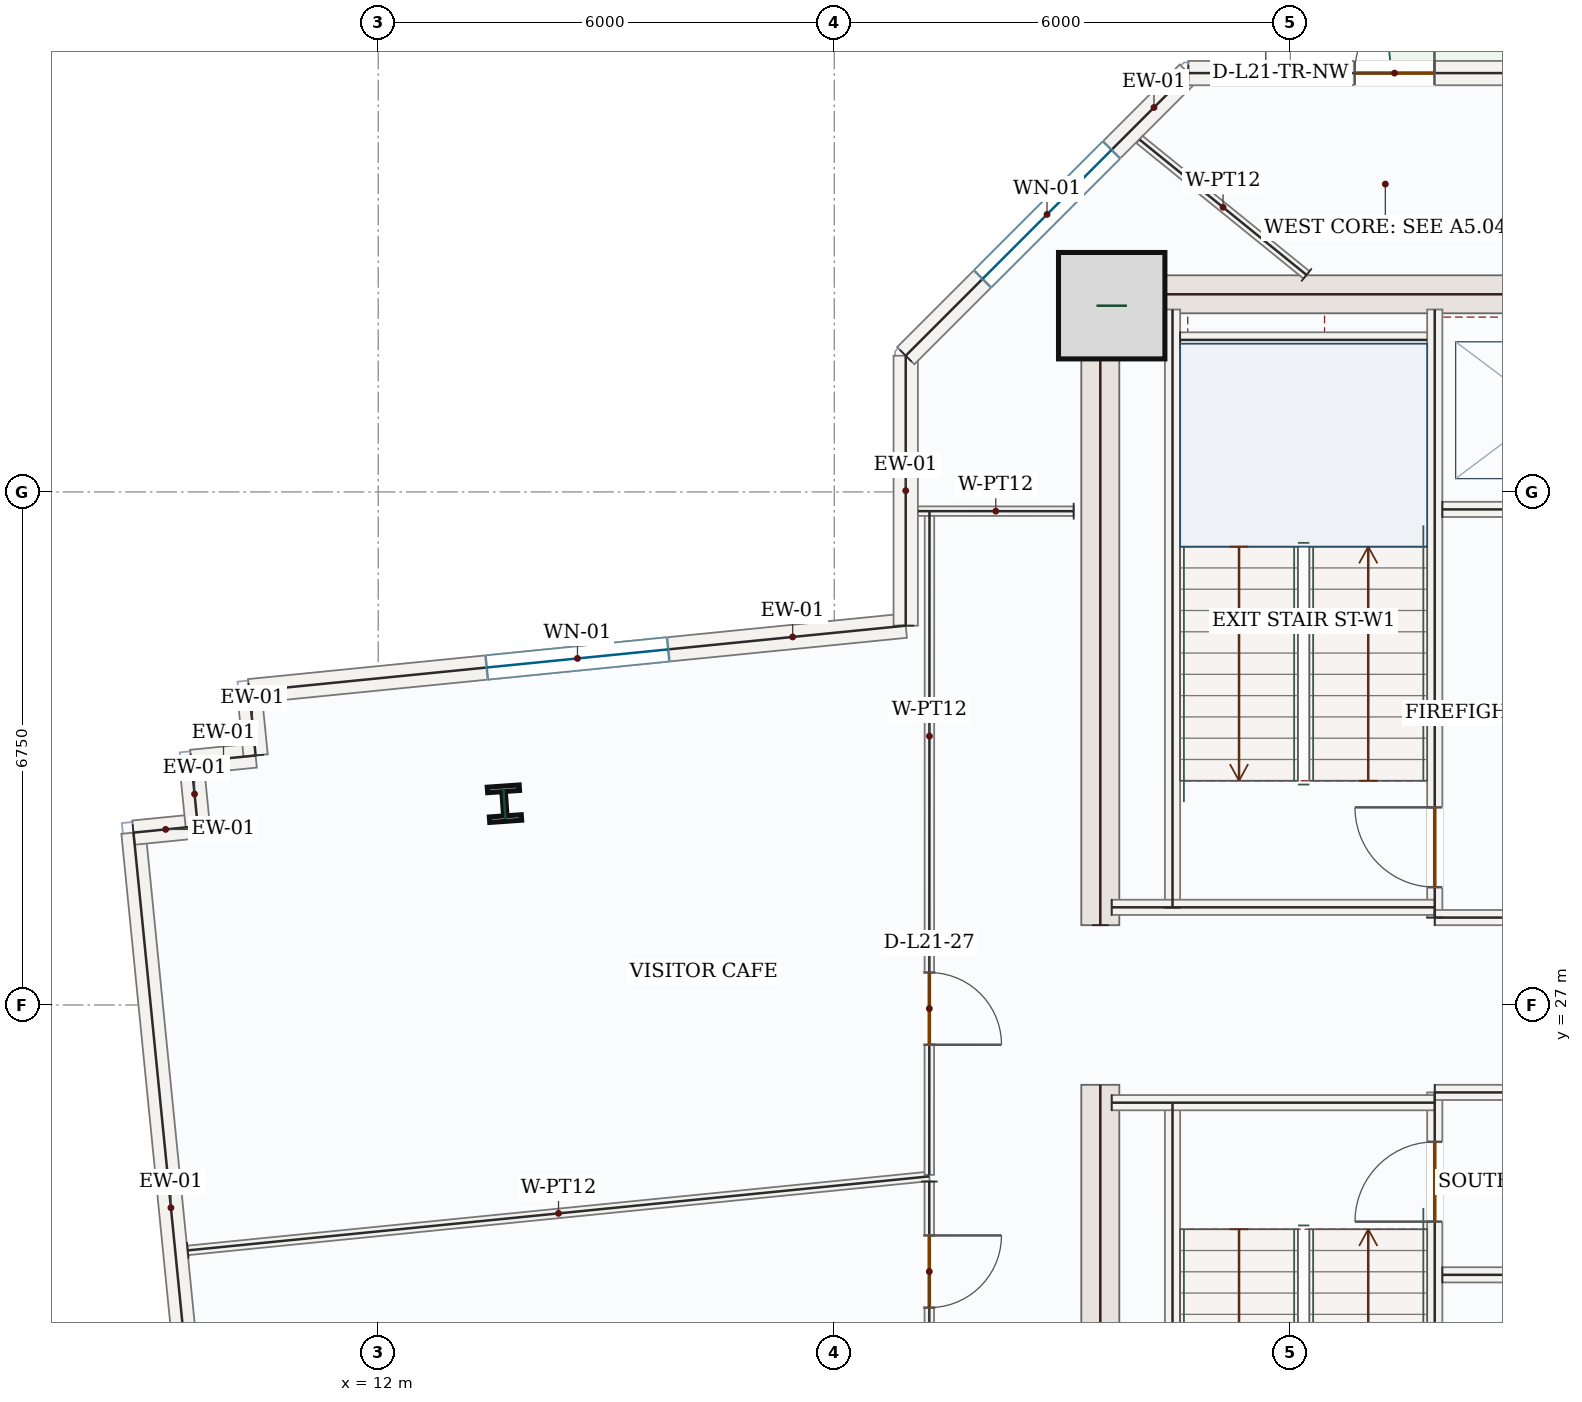
"""IFC4 building model, lengths in metres.
Left out: names, types, materials, properties, quantities, classifications, styles, units other than length and angle.
Written with IfcOpenShell. Run it as: python <this file> out.ifc"""

import sys

from ifc_helpers import new_model, si_unit, direction, frame, frame_2d, origin, origin_2d, place, context, subcontext, project, spatial, rectangle, i_section, extrude, source, transform, mapped, element, fill, save


model = new_model("IFC4")
c1 = context("Model", 3, precision=1e-05, world=origin(), true_north=direction((0.0, 1.0)))
c2 = subcontext(c1, "Body", "Model", "MODEL_VIEW")
j1 = project(units=[si_unit("LENGTHUNIT", "METRE"), si_unit("PLANEANGLEUNIT", "RADIAN")], contexts=[c1])
p1 = place(None, origin())
s1 = spatial("IfcSite", under=j1, at=p1, CompositionType="ELEMENT")
p2 = place(p1, origin())
s2 = spatial("IfcBuilding", under=s1, at=p2, CompositionType="ELEMENT")
p3 = place(p2, frame((0.0, 0.0, 96.3)))
s3 = spatial("IfcBuildingStorey", under=s2, at=p3, CompositionType="ELEMENT", Elevation=96.3)
m1 = source(origin(), c2, "Body", "SweptSolid", [
    extrude(rectangle(XDim=8.55, YDim=0.5, at=frame_2d((4.275, 0.0))), origin(), (0.0, 0.0, 1.0), 3.95),
])
for number, where, z_axis, x_axis in (
    (1, (21.5, 17.4, 0.0), (0.0, 0.0, 1.0), (0.0, 1.0, 0.0)),
    (2, (21.5, 28.05, 0.0), (0.0, 0.0, 1.0), (0.0, 1.0, 0.0)),
):
    element("IfcWall", number, at=place(p3, frame(where, z_axis=z_axis, x_axis=x_axis)), inside=s3, PredefinedType="SHEAR", context=c2, shape_type="MappedRepresentation", body=[
        mapped(m1, transform((0.0, 0.0, 0.0), x_axis=(1.0, 0.0, 0.0), y_axis=(0.0, 1.0, 0.0), z_axis=(0.0, 0.0, 1.0), scale=1.0)),
    ])
m2 = source(origin(), c2, "Body", "SweptSolid", [
    extrude(rectangle(XDim=7.0, YDim=0.5, at=frame_2d((3.5, 0.0))), origin(), (0.0, 0.0, 1.0), 3.95),
])
p4 = place(p3, frame((21.75, 36.35, 0.0), z_axis=(0.0, 0.0, 1.0), x_axis=(1.0, 0.0, 0.0)))
e3 = element("IfcWall", 3, at=p4, inside=s3, PredefinedType="SHEAR", context=c2, shape_type="MappedRepresentation", body=[
    mapped(m2, transform((0.0, 0.0, 0.0), x_axis=(1.0, 0.0, 0.0), y_axis=(0.0, 1.0, 0.0), z_axis=(0.0, 0.0, 1.0), scale=1.0)),
])
m3 = source(origin(), c2, "Body", "SweptSolid", [
    extrude(rectangle(XDim=1.4, YDim=1.4, at=origin_2d()), origin(), (0.0, 0.0, 1.0), 4.2),
])
p5 = place(p3, frame((21.65, 36.2, 0.0), z_axis=(0.0, 0.0, 1.0), x_axis=(1.0, 0.0, 0.0)))
e4 = element("IfcColumn", 4, at=p5, inside=s3, PredefinedType="COLUMN", context=c2, shape_type="MappedRepresentation", body=[
    mapped(m3, transform((0.0, 0.0, 0.0), x_axis=(1.0, 0.0, 0.0), y_axis=(0.0, 1.0, 0.0), z_axis=(0.0, 0.0, 1.0), scale=1.0)),
])
m4 = source(origin(), c2, "Body", "SweptSolid", [
    extrude(i_section(OverallWidth=0.421, OverallDepth=0.465, WebThickness=0.045, FlangeThickness=0.073, FilletRadius=0.018, at=origin_2d()), origin(), (0.0, 0.0, 1.0), 4.2),
])
p6 = place(p3, frame((13.661, 29.648, 0.0), z_axis=(0.0, 0.0, 1.0), x_axis=(0.99756405026, 0.069756473744, 0.0)))
e5 = element("IfcColumn", 5, at=p6, inside=s3, PredefinedType="COLUMN", context=c2, shape_type="MappedRepresentation", body=[
    mapped(m4, transform((0.0, 0.0, 0.0), x_axis=(1.0, 0.0, 0.0), y_axis=(0.0, 1.0, 0.0), z_axis=(0.0, 0.0, 1.0), scale=1.0)),
])
m5 = source(origin(), c2, "Body", "SweptSolid", [
    extrude(rectangle(XDim=9.92, YDim=0.32, at=frame_2d((4.96, 0.0))), origin(), (0.0, 0.0, 1.0), 3.95),
])
p7 = place(p3, frame((9.765, 19.397, 0.0), z_axis=(0.0, 0.0, 1.0), x_axis=(-0.099303907908, 0.995057151059, 0.0)))
e6 = element("IfcWall", 6, at=p7, inside=s3, PredefinedType="SOLIDWALL", context=c2, shape_type="MappedRepresentation", body=[
    mapped(m5, transform((0.0, 0.0, 0.0), x_axis=(1.0, 0.0, 0.0), y_axis=(0.0, 1.0, 0.0), z_axis=(0.0, 0.0, 1.0), scale=1.0)),
])
m6 = source(origin(), c2, "Body", "SweptSolid", [
    extrude(rectangle(XDim=0.85, YDim=0.32, at=frame_2d((0.425, 0.0))), origin(), (0.0, 0.0, 1.0), 3.95),
])
for number, where, z_axis, x_axis in (
    (7, (8.78, 29.268, 0.0), (0.0, 0.0, 1.0), (0.995, 0.099, 0.0)),
    (8, (9.626, 29.352, 0.0), (0.0, 0.0, 1.0), (-0.099, 0.995, 0.0)),
    (9, (9.542, 30.198, 0.0), (0.0, 0.0, 1.0), (0.995, 0.099, 0.0)),
    (10, (10.387, 30.282, 0.0), (0.0, 0.0, 1.0), (-0.099, 0.995, 0.0)),
):
    element("IfcWall", number, at=place(p3, frame(where, z_axis=z_axis, x_axis=x_axis)), inside=s3, PredefinedType="SOLIDWALL", context=c2, shape_type="MappedRepresentation", body=[
        mapped(m6, transform((0.0, 0.0, 0.0), x_axis=(1.0, 0.0, 0.0), y_axis=(0.0, 1.0, 0.0), z_axis=(0.0, 0.0, 1.0), scale=1.0)),
    ])
p8 = place(p3, frame((10.303, 31.128, 0.0), z_axis=(0.0, 0.0, 1.0), x_axis=(0.995055831351, 0.099317130918, 0.0)))
e11 = element("IfcWall", 11, at=p8, inside=s3, PredefinedType="SOLIDWALL", context=c2, shape_type="SweptSolid", body=[
    extrude(rectangle(XDim=8.68, YDim=0.32, at=frame_2d((4.34, 0.0))), origin(), (0.0, 0.0, 1.0), 3.95),
])
p9 = place(p8, frame((3.14, 0.0, 0.85)))
e12 = element("IfcOpeningElement", 12, at=p9, cuts=e11, PredefinedType="OPENING", context=c2, shape_type="SweptSolid", body=[
    extrude(rectangle(XDim=2.4, YDim=1.8, at=frame_2d((1.2, 0.9))), frame((0.0, 0.17, 0.0), z_axis=(0.0, -1.0, 0.0), x_axis=(1.0, 0.0, 0.0)), (0.0, 0.0, 1.0), 0.34),
])
m7 = source(origin(), c2, "Body", "SweptSolid", [
    extrude(rectangle(XDim=3.552, YDim=0.32, at=frame_2d((1.776, 0.0))), origin(), (0.0, 0.0, 1.0), 3.95),
])
p10 = place(p3, frame((18.94, 31.99, 0.0), z_axis=(0.0, 0.0, 1.0), x_axis=(0.0, 1.0, 0.0)))
e13 = element("IfcWall", 13, at=p10, inside=s3, PredefinedType="SOLIDWALL", context=c2, shape_type="MappedRepresentation", body=[
    mapped(m7, transform((0.0, 0.0, 0.0), x_axis=(1.0, 0.0, 0.0), y_axis=(0.0, 1.0, 0.0), z_axis=(0.0, 0.0, 1.0), scale=1.0)),
])
p11 = place(p3, frame((18.94, 35.542, 0.0), z_axis=(0.0, 0.0, 1.0), x_axis=(0.707106781187, 0.707106781187, 0.0)))
e14 = element("IfcWall", 14, at=p11, inside=s3, PredefinedType="SOLIDWALL", context=c2, shape_type="SweptSolid", body=[
    extrude(rectangle(XDim=5.258, YDim=0.32, at=frame_2d((2.629, 0.0))), origin(), (0.0, 0.0, 1.0), 3.95),
])
p12 = place(p11, frame((1.429, 0.0, 0.85)))
e15 = element("IfcOpeningElement", 15, at=p12, cuts=e14, PredefinedType="OPENING", context=c2, shape_type="SweptSolid", body=[
    extrude(rectangle(XDim=2.4, YDim=1.8, at=frame_2d((1.2, 0.9))), frame((0.0, 0.17, 0.0), z_axis=(0.0, -1.0, 0.0), x_axis=(1.0, 0.0, 0.0)), (0.0, 0.0, 1.0), 0.34),
])
p13 = place(p3, frame((22.658, 39.26, 0.0), z_axis=(0.0, 0.0, 1.0), x_axis=(1.0, 0.0, 0.0)))
e16 = element("IfcWall", 16, at=p13, inside=s3, PredefinedType="SOLIDWALL", context=c2, shape_type="SweptSolid", body=[
    extrude(rectangle(XDim=5.425, YDim=0.32, at=frame_2d((2.713, 0.0))), origin(), (0.0, 0.0, 1.0), 3.95),
])
p14 = place(p13, frame((2.188, 0.0, 0.0)))
e17 = element("IfcOpeningElement", 17, at=p14, cuts=e16, PredefinedType="OPENING", context=c2, shape_type="SweptSolid", body=[
    extrude(rectangle(XDim=1.05, YDim=2.15, at=frame_2d((0.525, 1.075))), frame((0.0, 0.17, 0.0), z_axis=(0.0, -1.0, 0.0), x_axis=(1.0, 0.0, 0.0)), (0.0, 0.0, 1.0), 0.34),
])
m8 = source(origin(), c2, "Body", "SweptSolid", [
    extrude(rectangle(XDim=7.87, YDim=0.2, at=frame_2d((3.935, 0.0))), origin(), (0.0, 0.0, 1.0), 3.95),
])
for number, where, z_axis, x_axis in (
    (18, (22.45, 17.85, 0.0), (0.0, 0.0, 1.0), (0.0, 1.0, 0.0)),
    (19, (22.45, 28.28, 0.0), (0.0, 0.0, 1.0), (0.0, 1.0, 0.0)),
):
    element("IfcWall", number, at=place(p3, frame(where, z_axis=z_axis, x_axis=x_axis)), inside=s3, PredefinedType="SOLIDWALL", context=c2, shape_type="MappedRepresentation", body=[
        mapped(m8, transform((0.0, 0.0, 0.0), x_axis=(1.0, 0.0, 0.0), y_axis=(0.0, 1.0, 0.0), z_axis=(0.0, 0.0, 1.0), scale=1.0)),
    ])
p15 = place(p3, frame((25.9, 17.85, 0.0), z_axis=(0.0, 0.0, 1.0), x_axis=(0.0, 1.0, 0.0)))
e20 = element("IfcWall", 20, at=p15, inside=s3, PredefinedType="SOLIDWALL", context=c2, shape_type="SweptSolid", body=[
    extrude(rectangle(XDim=8.0, YDim=0.2, at=frame_2d((4.0, 0.0))), origin(), (0.0, 0.0, 1.0), 3.95),
])
p16 = place(p15, frame((6.3, 0.0, 0.0)))
e21 = element("IfcOpeningElement", 21, at=p16, cuts=e20, PredefinedType="OPENING", context=c2, shape_type="SweptSolid", body=[
    extrude(rectangle(XDim=1.05, YDim=2.15, at=frame_2d((0.525, 1.075))), frame((0.0, 0.11, 0.0), z_axis=(0.0, -1.0, 0.0), x_axis=(1.0, 0.0, 0.0)), (0.0, 0.0, 1.0), 0.22),
])
p17 = place(p3, frame((25.9, 28.15, 0.0), z_axis=(0.0, 0.0, 1.0), x_axis=(0.0, 1.0, 0.0)))
e22 = element("IfcWall", 22, at=p17, inside=s3, PredefinedType="SOLIDWALL", context=c2, shape_type="SweptSolid", body=[
    extrude(rectangle(XDim=8.0, YDim=0.2, at=frame_2d((4.0, 0.0))), origin(), (0.0, 0.0, 1.0), 3.95),
])
p18 = place(p17, frame((0.4, 0.0, 0.0)))
e23 = element("IfcOpeningElement", 23, at=p18, cuts=e22, PredefinedType="OPENING", context=c2, shape_type="SweptSolid", body=[
    extrude(rectangle(XDim=1.05, YDim=2.15, at=frame_2d((0.525, 1.075))), frame((0.0, 0.11, 0.0), z_axis=(0.0, -1.0, 0.0), x_axis=(1.0, 0.0, 0.0)), (0.0, 0.0, 1.0), 0.22),
])
m9 = source(origin(), c2, "Body", "SweptSolid", [
    extrude(rectangle(XDim=4.25, YDim=0.2, at=frame_2d((2.125, 0.0))), origin(), (0.0, 0.0, 1.0), 3.95),
])
p19 = place(p3, frame((21.65, 25.715, 0.0), z_axis=(0.0, 0.0, 1.0), x_axis=(1.0, 0.0, 0.0)))
e24 = element("IfcWall", 24, at=p19, inside=s3, PredefinedType="SOLIDWALL", context=c2, shape_type="MappedRepresentation", body=[
    mapped(m9, transform((0.0, 0.0, 0.0), x_axis=(1.0, 0.0, 0.0), y_axis=(0.0, 1.0, 0.0), z_axis=(0.0, 0.0, 1.0), scale=1.0)),
])
m10 = source(origin(), c2, "Body", "SweptSolid", [
    extrude(rectangle(XDim=3.0, YDim=0.2, at=frame_2d((1.5, 0.0))), origin(), (0.0, 0.0, 1.0), 3.95),
])
p20 = place(p3, frame((25.9, 25.85, 0.0), z_axis=(0.0, 0.0, 1.0), x_axis=(1.0, 0.0, 0.0)))
e25 = element("IfcWall", 25, at=p20, inside=s3, PredefinedType="SOLIDWALL", context=c2, shape_type="MappedRepresentation", body=[
    mapped(m10, transform((0.0, 0.0, 0.0), x_axis=(1.0, 0.0, 0.0), y_axis=(0.0, 1.0, 0.0), z_axis=(0.0, 0.0, 1.0), scale=1.0)),
])
p21 = place(p3, frame((21.65, 28.285, 0.0), z_axis=(0.0, 0.0, 1.0), x_axis=(1.0, 0.0, 0.0)))
e26 = element("IfcWall", 26, at=p21, inside=s3, PredefinedType="SOLIDWALL", context=c2, shape_type="MappedRepresentation", body=[
    mapped(m9, transform((0.0, 0.0, 0.0), x_axis=(1.0, 0.0, 0.0), y_axis=(0.0, 1.0, 0.0), z_axis=(0.0, 0.0, 1.0), scale=1.0)),
])
p22 = place(p3, frame((25.9, 28.15, 0.0), z_axis=(0.0, 0.0, 1.0), x_axis=(1.0, 0.0, 0.0)))
e27 = element("IfcWall", 27, at=p22, inside=s3, PredefinedType="SOLIDWALL", context=c2, shape_type="MappedRepresentation", body=[
    mapped(m10, transform((0.0, 0.0, 0.0), x_axis=(1.0, 0.0, 0.0), y_axis=(0.0, 1.0, 0.0), z_axis=(0.0, 0.0, 1.0), scale=1.0)),
])
m11 = source(origin(), c2, "Body", "SweptSolid", [
    extrude(rectangle(XDim=3.25, YDim=0.2, at=frame_2d((1.625, 0.0))), origin(), (0.0, 0.0, 1.0), 3.95),
])
p23 = place(p3, frame((22.55, 35.75, 0.0), z_axis=(0.0, 0.0, 1.0), x_axis=(1.0, 0.0, 0.0)))
e28 = element("IfcWall", 28, at=p23, inside=s3, PredefinedType="SOLIDWALL", context=c2, shape_type="MappedRepresentation", body=[
    mapped(m11, transform((0.0, 0.0, 0.0), x_axis=(1.0, 0.0, 0.0), y_axis=(0.0, 1.0, 0.0), z_axis=(0.0, 0.0, 1.0), scale=1.0)),
])
p24 = place(p3, frame((26.0, 33.52, 0.0), z_axis=(0.0, 0.0, 1.0), x_axis=(1.0, 0.0, 0.0)))
e29 = element("IfcWall", 29, at=p24, inside=s3, PredefinedType="SOLIDWALL", context=c2, shape_type="SweptSolid", body=[
    extrude(rectangle(XDim=2.75, YDim=0.2, at=frame_2d((1.375, 0.0))), origin(), (0.0, 0.0, 1.0), 3.95),
])
p25 = place(p24, frame((0.82, 0.0, 0.0)))
e30 = element("IfcOpeningElement", 30, at=p25, cuts=e29, PredefinedType="OPENING", context=c2, shape_type="SweptSolid", body=[
    extrude(rectangle(XDim=1.1, YDim=2.15, at=frame_2d((0.55, 1.075))), frame((0.0, 0.11, 0.0), z_axis=(0.0, -1.0, 0.0), x_axis=(1.0, 0.0, 0.0)), (0.0, 0.0, 1.0), 0.22),
])
m12 = source(origin(), c2, "Body", "SweptSolid", [
    extrude(rectangle(XDim=2.75, YDim=0.2, at=frame_2d((1.375, 0.0))), origin(), (0.0, 0.0, 1.0), 3.95),
])
p26 = place(p3, frame((26.0, 23.45, 0.0), z_axis=(0.0, 0.0, 1.0), x_axis=(1.0, 0.0, 0.0)))
e31 = element("IfcWall", 31, at=p26, inside=s3, PredefinedType="SOLIDWALL", context=c2, shape_type="MappedRepresentation", body=[
    mapped(m12, transform((0.0, 0.0, 0.0), x_axis=(1.0, 0.0, 0.0), y_axis=(0.0, 1.0, 0.0), z_axis=(0.0, 0.0, 1.0), scale=1.0)),
])
m13 = source(origin(), c2, "Body", "SweptSolid", [
    extrude(rectangle(XDim=2.827, YDim=0.125, at=frame_2d((1.414, 0.0))), origin(), (0.0, 0.0, 1.0), 3.95),
])
p27 = place(p3, frame((24.213, 36.605, 0.0), z_axis=(0.0, 0.0, 1.0), x_axis=(-0.776808269954, 0.62973717671, 0.0)))
e32 = element("IfcWall", 32, at=p27, inside=s3, PredefinedType="PARTITIONING", context=c2, shape_type="MappedRepresentation", body=[
    mapped(m13, transform((0.0, 0.0, 0.0), x_axis=(1.0, 0.0, 0.0), y_axis=(0.0, 1.0, 0.0), z_axis=(0.0, 0.0, 1.0), scale=1.0)),
])
m14 = source(origin(), c2, "Body", "SweptSolid", [
    extrude(rectangle(XDim=9.804, YDim=0.125, at=frame_2d((4.902, 0.0))), origin(), (0.0, 0.0, 1.0), 3.95),
])
p28 = place(p3, frame((9.495, 23.771, 0.0), z_axis=(0.0, 0.0, 1.0), x_axis=(0.995053942122, 0.099336057238, 0.0)))
e33 = element("IfcWall", 33, at=p28, inside=s3, PredefinedType="PARTITIONING", context=c2, shape_type="MappedRepresentation", body=[
    mapped(m14, transform((0.0, 0.0, 0.0), x_axis=(1.0, 0.0, 0.0), y_axis=(0.0, 1.0, 0.0), z_axis=(0.0, 0.0, 1.0), scale=1.0)),
])
p29 = place(p3, frame((19.25, 24.677, 0.0), z_axis=(0.0, 0.0, 1.0), x_axis=(0.000116979586, -0.999999993158, 0.0)))
e34 = element("IfcWall", 34, at=p29, inside=s3, PredefinedType="PARTITIONING", context=c2, shape_type="SweptSolid", body=[
    extrude(rectangle(XDim=4.174, YDim=0.125, at=frame_2d((2.087, 0.0))), origin(), (0.0, 0.0, 1.0), 3.95),
])
p30 = place(p29, frame((0.709, 0.0, 0.0)))
e35 = element("IfcOpeningElement", 35, at=p30, cuts=e34, PredefinedType="OPENING", context=c2, shape_type="SweptSolid", body=[
    extrude(rectangle(XDim=0.95, YDim=2.15, at=frame_2d((0.475, 1.075))), frame((0.0, 0.073, 0.0), z_axis=(0.0, -1.0, 0.0), x_axis=(1.0, 0.0, 0.0)), (0.0, 0.0, 1.0), 0.145),
])
p31 = place(p3, frame((19.253, 33.497, 0.0), z_axis=(0.0, 0.0, 1.0), x_axis=(-0.000307554646, -0.999999952705, 0.0)))
e36 = element("IfcWall", 36, at=p31, inside=s3, PredefinedType="PARTITIONING", context=c2, shape_type="SweptSolid", body=[
    extrude(rectangle(XDim=8.732, YDim=0.125, at=frame_2d((4.366, 0.0))), origin(), (0.0, 0.0, 1.0), 3.95),
])
p32 = place(p31, frame((6.07, 0.0, 0.0)))
e37 = element("IfcOpeningElement", 37, at=p32, cuts=e36, PredefinedType="OPENING", context=c2, shape_type="SweptSolid", body=[
    extrude(rectangle(XDim=0.95, YDim=2.15, at=frame_2d((0.475, 1.075))), frame((0.0, 0.073, 0.0), z_axis=(0.0, -1.0, 0.0), x_axis=(1.0, 0.0, 0.0)), (0.0, 0.0, 1.0), 0.145),
])
m15 = source(origin(), c2, "Body", "SweptSolid", [
    extrude(rectangle(XDim=2.049, YDim=0.125, at=frame_2d((1.025, 0.0))), origin(), (0.0, 0.0, 1.0), 3.95),
])
p33 = place(p3, frame((21.149, 33.497, 0.0), z_axis=(0.0, 0.0, 1.0), x_axis=(-0.999999936133, 0.000357398119, 0.0)))
e38 = element("IfcWall", 38, at=p33, inside=s3, PredefinedType="PARTITIONING", context=c2, shape_type="MappedRepresentation", body=[
    mapped(m15, transform((0.0, 0.0, 0.0), x_axis=(1.0, 0.0, 0.0), y_axis=(0.0, 1.0, 0.0), z_axis=(0.0, 0.0, 1.0), scale=1.0)),
])
m16 = source(origin(), c2, "Body", "SweptSolid", [
    extrude(rectangle(XDim=2.4, YDim=1.8, at=frame_2d((1.2, 0.9))), frame((0.0, 0.03, 0.0), z_axis=(0.0, -1.0, 0.0), x_axis=(1.0, 0.0, 0.0)), (0.0, 0.0, 1.0), 0.06),
])
p34 = place(p9, origin())
e39 = element("IfcWindow", 39, at=p34, inside=s3, PartitioningType="DOUBLE_PANEL_VERTICAL", PredefinedType="WINDOW", context=c2, shape_type="MappedRepresentation", body=[
    mapped(m16, transform((0.0, 0.0, 0.0), x_axis=(1.0, 0.0, 0.0), y_axis=(0.0, 1.0, 0.0), z_axis=(0.0, 0.0, 1.0), scale=1.0)),
])
fill(e12, e39)
p35 = place(p12, origin())
e40 = element("IfcWindow", 40, at=p35, inside=s3, PartitioningType="DOUBLE_PANEL_VERTICAL", PredefinedType="WINDOW", context=c2, shape_type="MappedRepresentation", body=[
    mapped(m16, transform((0.0, 0.0, 0.0), x_axis=(1.0, 0.0, 0.0), y_axis=(0.0, 1.0, 0.0), z_axis=(0.0, 0.0, 1.0), scale=1.0)),
])
fill(e15, e40)
m17 = source(origin(), c2, "Body", "SweptSolid", [
    extrude(rectangle(XDim=1.05, YDim=2.15, at=frame_2d((0.525, 1.075))), frame((0.0, 0.025, 0.0), z_axis=(0.0, -1.0, 0.0), x_axis=(1.0, 0.0, 0.0)), (0.0, 0.0, 1.0), 0.05),
])
p36 = place(p14, origin())
e41 = element("IfcDoor", 41, at=p36, inside=s3, OperationType="SINGLE_SWING_RIGHT", PredefinedType="DOOR", context=c2, shape_type="MappedRepresentation", body=[
    mapped(m17, transform((0.0, 0.0, 0.0), x_axis=(1.0, 0.0, 0.0), y_axis=(0.0, 1.0, 0.0), z_axis=(0.0, 0.0, 1.0), scale=1.0)),
])
fill(e17, e41)
p37 = place(p18, origin())
e42 = element("IfcDoor", 42, at=p37, inside=s3, OperationType="SINGLE_SWING_RIGHT", PredefinedType="DOOR", context=c2, shape_type="MappedRepresentation", body=[
    mapped(m17, transform((0.0, 0.0, 0.0), x_axis=(1.0, 0.0, 0.0), y_axis=(0.0, 1.0, 0.0), z_axis=(0.0, 0.0, 1.0), scale=1.0)),
])
fill(e23, e42)
p38 = place(p16, origin())
e43 = element("IfcDoor", 43, at=p38, inside=s3, OperationType="SINGLE_SWING_LEFT", PredefinedType="DOOR", context=c2, shape_type="MappedRepresentation", body=[
    mapped(m17, transform((0.0, 0.0, 0.0), x_axis=(1.0, 0.0, 0.0), y_axis=(0.0, 1.0, 0.0), z_axis=(0.0, 0.0, 1.0), scale=1.0)),
])
fill(e21, e43)
m18 = source(origin(), c2, "Body", "SweptSolid", [
    extrude(rectangle(XDim=0.95, YDim=2.15, at=frame_2d((0.475, 1.075))), frame((0.0, 0.025, 0.0), z_axis=(0.0, -1.0, 0.0), x_axis=(1.0, 0.0, 0.0)), (0.0, 0.0, 1.0), 0.05),
])
p39 = place(p32, origin())
e44 = element("IfcDoor", 44, at=p39, inside=s3, OperationType="SINGLE_SWING_RIGHT", PredefinedType="DOOR", context=c2, shape_type="MappedRepresentation", body=[
    mapped(m18, transform((0.0, 0.0, 0.0), x_axis=(1.0, 0.0, 0.0), y_axis=(0.0, 1.0, 0.0), z_axis=(0.0, 0.0, 1.0), scale=1.0)),
])
fill(e37, e44)
p40 = place(p30, origin())
e45 = element("IfcDoor", 45, at=p40, inside=s3, OperationType="SINGLE_SWING_LEFT", PredefinedType="DOOR", context=c2, shape_type="MappedRepresentation", body=[
    mapped(m18, transform((0.0, 0.0, 0.0), x_axis=(1.0, 0.0, 0.0), y_axis=(0.0, 1.0, 0.0), z_axis=(0.0, 0.0, 1.0), scale=1.0)),
])
fill(e35, e45)
save(model, sys.argv[1])
